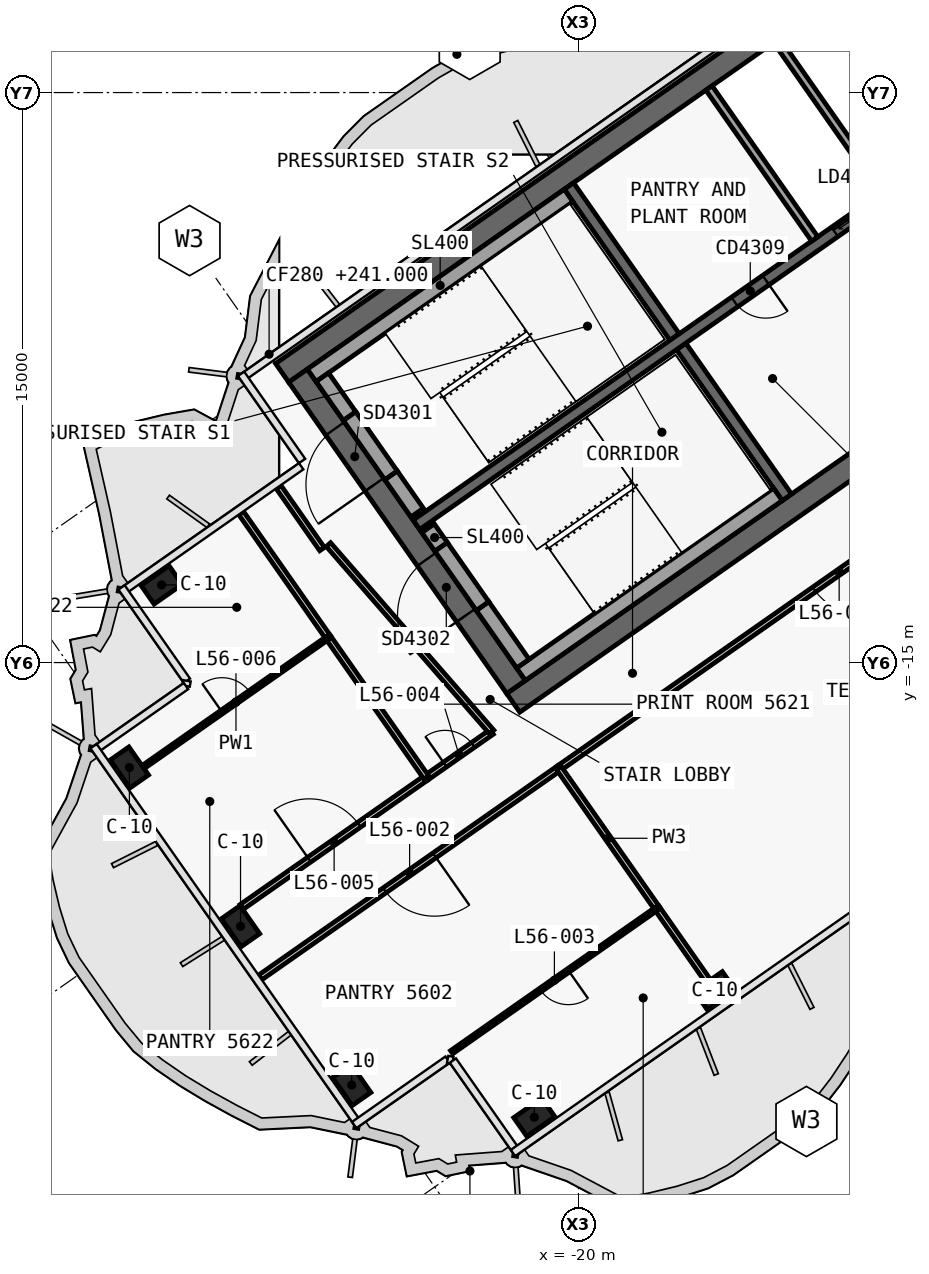
"""IFC4 building model, lengths in metres.
Left out: names, types, materials, properties, quantities, classifications, styles, units other than length and angle.
Written with IfcOpenShell. Run it as: python <this file> out.ifc"""

import sys

from ifc_helpers import new_model, si_unit, direction, frame, frame_2d, origin, origin_2d, place, context, subcontext, project, spatial, polyline, rectangle, outline, extrude, element, fill, save


model = new_model("IFC4")
c1 = context("Model", 3, precision=1e-05, world=origin(), true_north=direction((0.0, 1.0)))
c2 = subcontext(c1, "Body", "Model", "MODEL_VIEW")
j1 = project(units=[si_unit("LENGTHUNIT", "METRE"), si_unit("PLANEANGLEUNIT", "RADIAN")], contexts=[c1])
p1 = place(None, origin())
s1 = spatial("IfcSite", under=j1, at=p1, CompositionType="ELEMENT")
p2 = place(p1, origin())
s2 = spatial("IfcBuilding", under=s1, at=p2, CompositionType="ELEMENT")
p3 = place(p2, frame((0.0, 0.0, 241.0)))
s3 = spatial("IfcBuildingStorey", under=s2, at=p3, CompositionType="ELEMENT", Elevation=241.0)
p4 = place(p3, frame((-0.028, 12.066, 0.0), z_axis=(0.0, 0.0, 1.0), x_axis=(-0.819151382952, -0.573577380837, 0.0)))
e1 = element("IfcWall", 1, at=p4, inside=s3, PredefinedType="SHEAR", context=c2, shape_type="SweptSolid", body=[
    extrude(outline(polyline([(33.898, 0.3), (0.42, 0.3), (0.0, -0.3), (33.898, -0.3), (33.898, 0.3)])), origin(), (0.0, 0.0, 1.0), 3.9),
])
p5 = place(p3, frame((-0.028, -0.874, 0.0), z_axis=(0.0, 0.0, 1.0), x_axis=(-0.819150035022, -0.573579305871, 0.0)))
e2 = element("IfcWall", 2, at=p5, inside=s3, PredefinedType="SHEAR", context=c2, shape_type="SweptSolid", body=[
    extrude(outline(polyline([(26.476, 0.3), (0.42, 0.3), (0.0, -0.3), (26.476, -0.3), (26.476, 0.3)])), origin(), (0.0, 0.0, 1.0), 3.9),
])
p6 = place(p5, frame((2.976, 0.0, 0.0)))
e3 = element("IfcOpeningElement", 3, at=p6, cuts=e2, PredefinedType="OPENING", context=c2, shape_type="SweptSolid", body=[
    extrude(rectangle(XDim=2.4, YDim=2.1, at=frame_2d((1.2, 1.05))), frame((0.0, 0.31, 0.0), z_axis=(0.0, -1.0, 0.0), x_axis=(1.0, 0.0, 0.0)), (0.0, 0.0, 1.0), 0.62),
])
p7 = place(p5, frame((11.776, 0.0, 0.0)))
e4 = element("IfcOpeningElement", 4, at=p7, cuts=e2, PredefinedType="OPENING", context=c2, shape_type="SweptSolid", body=[
    extrude(rectangle(XDim=2.4, YDim=2.1, at=frame_2d((1.2, 1.05))), frame((0.0, 0.31, 0.0), z_axis=(0.0, -1.0, 0.0), x_axis=(1.0, 0.0, 0.0)), (0.0, 0.0, 1.0), 0.62),
])
p8 = place(p3, frame((-21.642, -15.642, 0.0), z_axis=(0.0, 0.0, 1.0), x_axis=(-0.573586866468, 0.819144740944, 0.0)))
e5 = element("IfcWall", 5, at=p8, inside=s3, PredefinedType="SHEAR", context=c2, shape_type="SweptSolid", body=[
    extrude(outline(polyline([(0.0, 0.3), (0.0, -0.3), (10.0, -0.3), (10.0, 0.3), (0.0, 0.3)])), origin(), (0.0, 0.0, 1.0), 3.9),
])
p9 = place(p8, frame((6.5, 0.0, 0.0)))
e6 = element("IfcOpeningElement", 6, at=p9, cuts=e5, PredefinedType="OPENING", context=c2, shape_type="SweptSolid", body=[
    extrude(rectangle(XDim=1.8, YDim=2.1, at=frame_2d((0.9, 1.05))), frame((0.0, 0.31, 0.0), z_axis=(0.0, -1.0, 0.0), x_axis=(1.0, 0.0, 0.0)), (0.0, 0.0, 1.0), 0.62),
])
p10 = place(p8, frame((2.3, 0.0, 0.0)))
e7 = element("IfcOpeningElement", 7, at=p10, cuts=e5, PredefinedType="OPENING", context=c2, shape_type="SweptSolid", body=[
    extrude(rectangle(XDim=1.8, YDim=2.1, at=frame_2d((0.9, 1.05))), frame((0.0, 0.31, 0.0), z_axis=(0.0, -1.0, 0.0), x_axis=(1.0, 0.0, 0.0)), (0.0, 0.0, 1.0), 0.62),
])
p11 = place(p3, frame((-10.097, -1.271, 0.0), z_axis=(0.0, 0.0, 1.0), x_axis=(-0.573560315113, 0.819163332265, 0.0)))
e8 = element("IfcWall", 8, at=p11, inside=s3, PredefinedType="SHEAR", context=c2, shape_type="SweptSolid", body=[
    extrude(outline(polyline([(4.85, -0.15), (4.85, 0.15), (0.0, 0.15), (0.0, -0.15), (4.85, -0.15)])), origin(), (0.0, 0.0, 1.0), 3.9),
])
p12 = place(p3, frame((-14.515, -10.652, 0.0), z_axis=(0.0, 0.0, 1.0), x_axis=(-0.573560315113, 0.819163332265, 0.0)))
e9 = element("IfcWall", 9, at=p12, inside=s3, PredefinedType="SHEAR", context=c2, shape_type="SweptSolid", body=[
    extrude(outline(polyline([(4.85, 0.15), (0.0, 0.15), (0.0, -0.15), (4.85, -0.15), (4.85, 0.15)])), origin(), (0.0, 0.0, 1.0), 3.9),
])
p13 = place(p3, frame((-17.469, -6.433, 0.0), z_axis=(0.0, 0.0, 1.0), x_axis=(-0.573594092424, 0.81913968109, 0.0)))
e10 = element("IfcWall", 10, at=p13, inside=s3, PredefinedType="SHEAR", context=c2, shape_type="SweptSolid", body=[
    extrude(outline(polyline([(4.85, -0.15), (4.85, 0.15), (0.0, 0.15), (0.0, -0.15), (4.85, -0.15)])), origin(), (0.0, 0.0, 1.0), 3.9),
])
p14 = place(p3, frame((-2.638, 3.768, 0.0), z_axis=(0.0, 0.0, 1.0), x_axis=(-0.819155014212, -0.573572194837, 0.0)))
e11 = element("IfcWall", 11, at=p14, inside=s3, PredefinedType="SHEAR", context=c2, shape_type="SweptSolid", body=[
    extrude(outline(polyline([(26.4, 0.15), (0.0, 0.15), (0.0, -0.15), (26.4, -0.15), (26.4, 0.15)])), origin(), (0.0, 0.0, 1.0), 3.9),
])
p15 = place(p14, frame((1.169, 0.0, 0.0)))
e12 = element("IfcOpeningElement", 12, at=p15, cuts=e11, PredefinedType="OPENING", context=c2, shape_type="SweptSolid", body=[
    extrude(rectangle(XDim=1.1, YDim=2.1, at=frame_2d((0.55, 1.05))), frame((0.0, 0.16, 0.0), z_axis=(0.0, -1.0, 0.0), x_axis=(1.0, 0.0, 0.0)), (0.0, 0.0, 1.0), 0.32),
])
p16 = place(p14, frame((3.206, 0.0, 0.0)))
e13 = element("IfcOpeningElement", 13, at=p16, cuts=e11, PredefinedType="OPENING", context=c2, shape_type="SweptSolid", body=[
    extrude(rectangle(XDim=1.1, YDim=2.1, at=frame_2d((0.55, 1.05))), frame((0.0, 0.16, 0.0), z_axis=(0.0, -1.0, 0.0), x_axis=(1.0, 0.0, 0.0)), (0.0, 0.0, 1.0), 0.32),
])
p17 = place(p14, frame((5.244, 0.0, 0.0)))
e14 = element("IfcOpeningElement", 14, at=p17, cuts=e11, PredefinedType="OPENING", context=c2, shape_type="SweptSolid", body=[
    extrude(rectangle(XDim=1.1, YDim=2.1, at=frame_2d((0.55, 1.05))), frame((0.0, 0.16, 0.0), z_axis=(0.0, -1.0, 0.0), x_axis=(1.0, 0.0, 0.0)), (0.0, 0.0, 1.0), 0.32),
])
p18 = place(p14, frame((7.281, 0.0, 0.0)))
e15 = element("IfcOpeningElement", 15, at=p18, cuts=e11, PredefinedType="OPENING", context=c2, shape_type="SweptSolid", body=[
    extrude(rectangle(XDim=1.1, YDim=2.1, at=frame_2d((0.55, 1.05))), frame((0.0, 0.16, 0.0), z_axis=(0.0, -1.0, 0.0), x_axis=(1.0, 0.0, 0.0)), (0.0, 0.0, 1.0), 0.32),
])
p19 = place(p14, frame((9.688, 0.0, 0.0)))
e16 = element("IfcOpeningElement", 16, at=p19, cuts=e11, PredefinedType="OPENING", context=c2, shape_type="SweptSolid", body=[
    extrude(rectangle(XDim=1.1, YDim=2.1, at=frame_2d((0.55, 1.05))), frame((0.0, 0.16, 0.0), z_axis=(0.0, -1.0, 0.0), x_axis=(1.0, 0.0, 0.0)), (0.0, 0.0, 1.0), 0.32),
])
p20 = place(p14, frame((11.863, 0.0, 0.0)))
e17 = element("IfcOpeningElement", 17, at=p20, cuts=e11, PredefinedType="OPENING", context=c2, shape_type="SweptSolid", body=[
    extrude(rectangle(XDim=1.1, YDim=2.1, at=frame_2d((0.55, 1.05))), frame((0.0, 0.16, 0.0), z_axis=(0.0, -1.0, 0.0), x_axis=(1.0, 0.0, 0.0)), (0.0, 0.0, 1.0), 0.32),
])
p21 = place(p14, frame((15.175, 0.0, 0.0)))
e18 = element("IfcOpeningElement", 18, at=p21, cuts=e11, PredefinedType="OPENING", context=c2, shape_type="SweptSolid", body=[
    extrude(rectangle(XDim=1.0, YDim=2.1, at=frame_2d((0.5, 1.05))), frame((0.0, 0.16, 0.0), z_axis=(0.0, -1.0, 0.0), x_axis=(1.0, 0.0, 0.0)), (0.0, 0.0, 1.0), 0.32),
])
for number, where, z_axis, x_axis in (
    (19, (-16.41, -23.637, 0.0), (0.0, 0.0, 1.0), (-0.819, -0.574, 0.0)),
    (20, (-21.161, -26.964, 0.0), (0.0, 0.0, 1.0), (-0.819, -0.574, 0.0)),
    (21, (-30.969, -12.956, 0.0), (0.0, 0.0, 1.0), (-0.819, -0.574, 0.0)),
    (22, (-25.966, -26.117, 0.0), (0.0, 0.0, 1.0), (-0.574, 0.819, 0.0)),
    (23, (-28.891, -21.939, 0.0), (0.0, 0.0, 1.0), (-0.574, 0.819, 0.0)),
    (24, (-31.816, -17.761, 0.0), (0.0, 0.0, 1.0), (-0.574, 0.819, 0.0)),
):
    element("IfcColumn", number, at=place(p3, frame(where, z_axis=z_axis, x_axis=x_axis)), inside=s3, PredefinedType="COLUMN", context=c2, shape_type="SweptSolid", body=[
        extrude(rectangle(XDim=0.9, YDim=0.6, at=origin_2d()), origin(), (0.0, 0.0, 1.0), 3.9),
    ])
p22 = place(p3, frame((-12.001, -2.605, 0.0), z_axis=(0.0, 0.0, 1.0), x_axis=(-0.573560315113, 0.819163332265, 0.0)))
e25 = element("IfcWall", 25, at=p22, inside=s3, PredefinedType="SOLIDWALL", context=c2, shape_type="SweptSolid", body=[
    extrude(rectangle(XDim=4.85, YDim=0.2, at=frame_2d((2.425, 0.0))), origin(), (0.0, 0.0, 1.0), 3.9),
])
p23 = place(p3, frame((-13.783, -3.852, 0.0), z_axis=(0.0, 0.0, 1.0), x_axis=(-0.573594092424, 0.81913968109, 0.0)))
e26 = element("IfcWall", 26, at=p23, inside=s3, PredefinedType="SOLIDWALL", context=c2, shape_type="SweptSolid", body=[
    extrude(rectangle(XDim=4.85, YDim=0.2, at=frame_2d((2.425, 0.0))), origin(), (0.0, 0.0, 1.0), 3.9),
])
p24 = place(p3, frame((-20.259, -2.71, 0.0), z_axis=(0.0, 0.0, 1.0), x_axis=(-0.81914849389, -0.573581506813, 0.0)))
e27 = element("IfcWall", 27, at=p24, inside=s3, PredefinedType="SOLIDWALL", context=c2, shape_type="SweptSolid", body=[
    extrude(rectangle(XDim=8.25, YDim=0.4, at=frame_2d((4.125, 0.0))), origin(), (0.0, 0.0, 1.0), 3.62),
])
p25 = place(p3, frame((-24.244, -11.055, 0.0), z_axis=(0.0, 0.0, 1.0), x_axis=(-0.573571582932, 0.819155442668, 0.0)))
e28 = element("IfcWall", 28, at=p25, inside=s3, PredefinedType="SOLIDWALL", context=c2, shape_type="SweptSolid", body=[
    extrude(rectangle(XDim=1.2, YDim=0.4, at=frame_2d((0.6, 0.0))), origin(), (0.0, 0.0, 1.0), 3.62),
])
p26 = place(p3, frame((-26.022, -8.515, 0.0), z_axis=(0.0, 0.0, 1.0), x_axis=(-0.573619628835, 0.819121798889, 0.0)))
e29 = element("IfcWall", 29, at=p26, inside=s3, PredefinedType="SOLIDWALL", context=c2, shape_type="SweptSolid", body=[
    extrude(rectangle(XDim=1.25, YDim=0.4, at=frame_2d((0.625, 0.0))), origin(), (0.0, 0.0, 1.0), 3.62),
])
p27 = place(p3, frame((-24.932, -10.072, 2.15), z_axis=(0.0, 0.0, 1.0), x_axis=(-0.573591692345, 0.819141361715, 0.0)))
e30 = element("IfcWall", 30, at=p27, inside=s3, PredefinedType="SOLIDWALL", context=c2, shape_type="SweptSolid", body=[
    extrude(rectangle(XDim=1.9, YDim=0.4, at=frame_2d((0.95, 0.0))), origin(), (0.0, 0.0, 1.0), 1.47),
])
p28 = place(p3, frame((-14.753, -10.574, 0.0), z_axis=(0.0, 0.0, 1.0), x_axis=(-0.819158229677, -0.573567602601, 0.0)))
e31 = element("IfcWall", 31, at=p28, inside=s3, PredefinedType="SOLIDWALL", context=c2, shape_type="SweptSolid", body=[
    extrude(rectangle(XDim=8.25, YDim=0.4, at=frame_2d((4.125, 0.0))), origin(), (0.0, 0.0, 1.0), 3.62),
])
p29 = place(p3, frame((-21.462, -15.028, 0.0), z_axis=(0.0, 0.0, 1.0), x_axis=(-0.573559770908, 0.819163713305, 0.0)))
e32 = element("IfcWall", 32, at=p29, inside=s3, PredefinedType="SOLIDWALL", context=c2, shape_type="SweptSolid", body=[
    extrude(rectangle(XDim=1.85, YDim=0.4, at=frame_2d((0.925, 0.0))), origin(), (0.0, 0.0, 1.0), 3.62),
])
p30 = place(p3, frame((-23.613, -11.956, 0.0), z_axis=(0.0, 0.0, 1.0), x_axis=(-0.573435029941, 0.819251039936, 0.0)))
e33 = element("IfcWall", 33, at=p30, inside=s3, PredefinedType="SOLIDWALL", context=c2, shape_type="SweptSolid", body=[
    extrude(rectangle(XDim=0.6, YDim=0.4, at=frame_2d((0.3, 0.0))), origin(), (0.0, 0.0, 1.0), 3.62),
])
p31 = place(p3, frame((-22.523, -13.512, 2.15), z_axis=(0.0, 0.0, 1.0), x_axis=(-0.573591692345, 0.819141361715, 0.0)))
e34 = element("IfcWall", 34, at=p31, inside=s3, PredefinedType="SOLIDWALL", context=c2, shape_type="SweptSolid", body=[
    extrude(rectangle(XDim=1.9, YDim=0.4, at=frame_2d((0.95, 0.0))), origin(), (0.0, 0.0, 1.0), 1.47),
])
p32 = place(p3, frame((-24.002, -18.028, 0.0), z_axis=(0.0, 0.0, 1.0), x_axis=(0.819144473797, 0.573587247982, 0.0)))
e35 = element("IfcWall", 35, at=p32, inside=s3, PredefinedType="PARTITIONING", context=c2, shape_type="SweptSolid", body=[
    extrude(rectangle(XDim=2.099, YDim=0.15, at=frame_2d((1.049, 0.0))), origin(), (0.0, 0.0, 1.0), 3.62),
])
p33 = place(p32, frame((0.599, 0.0, 0.0)))
e36 = element("IfcOpeningElement", 36, at=p33, cuts=e35, PredefinedType="OPENING", context=c2, shape_type="SweptSolid", body=[
    extrude(rectangle(XDim=0.9, YDim=2.1, at=frame_2d((0.45, 1.05))), frame((0.0, 0.085, 0.0), z_axis=(0.0, -1.0, 0.0), x_axis=(1.0, 0.0, 0.0)), (0.0, 0.0, 1.0), 0.17),
])
p34 = place(p3, frame((-28.858, -21.428, 0.0), z_axis=(0.0, 0.0, 1.0), x_axis=(0.819137166599, 0.573597683308, 0.0)))
e37 = element("IfcWall", 37, at=p34, inside=s3, PredefinedType="PARTITIONING", context=c2, shape_type="SweptSolid", body=[
    extrude(rectangle(XDim=5.932, YDim=0.15, at=frame_2d((2.966, 0.0))), origin(), (0.0, 0.0, 1.0), 3.05),
])
p35 = place(p34, frame((2.166, 0.0, 0.0)))
e38 = element("IfcOpeningElement", 38, at=p35, cuts=e37, PredefinedType="OPENING", context=c2, shape_type="SweptSolid", body=[
    extrude(rectangle(XDim=1.6, YDim=2.1, at=frame_2d((0.8, 1.05))), frame((0.0, 0.085, 0.0), z_axis=(0.0, -1.0, 0.0), x_axis=(1.0, 0.0, 0.0)), (0.0, 0.0, 1.0), 0.17),
])
p36 = place(p3, frame((-5.766, -7.456, 0.0), z_axis=(0.0, 0.0, 1.0), x_axis=(-0.819153544995, -0.573574293115, 0.0)))
e39 = element("IfcWall", 39, at=p36, inside=s3, PredefinedType="PARTITIONING", context=c2, shape_type="SweptSolid", body=[
    extrude(rectangle(XDim=18.002, YDim=0.15, at=frame_2d((9.001, 0.0))), origin(), (0.0, 0.0, 1.0), 3.05),
])
p37 = place(p36, frame((8.201, 0.0, 0.0)))
e40 = element("IfcOpeningElement", 40, at=p37, cuts=e39, PredefinedType="OPENING", context=c2, shape_type="SweptSolid", body=[
    extrude(rectangle(XDim=1.6, YDim=2.1, at=frame_2d((0.8, 1.05))), frame((0.0, 0.085, 0.0), z_axis=(0.0, -1.0, 0.0), x_axis=(1.0, 0.0, 0.0)), (0.0, 0.0, 1.0), 0.17),
])
p38 = place(p3, frame((-20.51, -17.779, 0.0), z_axis=(0.0, 0.0, 1.0), x_axis=(-0.819147101588, -0.573583495196, 0.0)))
e41 = element("IfcWall", 41, at=p38, inside=s3, PredefinedType="PARTITIONING", context=c2, shape_type="SweptSolid", body=[
    extrude(rectangle(XDim=9.602, YDim=0.15, at=frame_2d((4.801, 0.0))), origin(), (0.0, 0.0, 1.0), 3.0),
])
p39 = place(p38, frame((4.001, 0.0, 0.0)))
e42 = element("IfcOpeningElement", 42, at=p39, cuts=e41, PredefinedType="OPENING", context=c2, shape_type="SweptSolid", body=[
    extrude(rectangle(XDim=1.6, YDim=2.1, at=frame_2d((0.8, 1.05))), frame((0.0, 0.085, 0.0), z_axis=(0.0, -1.0, 0.0), x_axis=(1.0, 0.0, 0.0)), (0.0, 0.0, 1.0), 0.17),
])
p40 = place(p3, frame((-26.746, -12.014, 0.0), z_axis=(0.0, 0.0, 1.0), x_axis=(-0.573568836472, 0.819157365729, 0.0)))
e43 = element("IfcWall", 43, at=p40, inside=s3, PredefinedType="PARTITIONING", context=c2, shape_type="SweptSolid", body=[
    extrude(rectangle(XDim=2.0, YDim=0.15, at=frame_2d((1.0, 0.0))), origin(), (0.0, 0.0, 1.0), 3.05),
])
p41 = place(p3, frame((-22.284, -16.826, 0.0), z_axis=(0.0, 0.0, 1.0), x_axis=(-0.656758142177, 0.754101281449, 0.0)))
e44 = element("IfcWall", 44, at=p41, inside=s3, PredefinedType="PARTITIONING", context=c2, shape_type="SweptSolid", body=[
    extrude(rectangle(XDim=6.539, YDim=0.15, at=frame_2d((3.269, 0.0))), origin(), (0.0, 0.0, 1.0), 3.62),
])
p42 = place(p3, frame((-26.582, -14.341, 0.0), z_axis=(0.0, 0.0, 1.0), x_axis=(-0.573593387921, 0.81914017441, 0.0)))
e45 = element("IfcWall", 45, at=p42, inside=s3, PredefinedType="PARTITIONING", context=c2, shape_type="SweptSolid", body=[
    extrude(rectangle(XDim=4.001, YDim=0.15, at=frame_2d((2.0, 0.0))), origin(), (0.0, 0.0, 1.0), 3.05),
])
p43 = place(p3, frame((-24.001, -18.026, 0.0), z_axis=(0.0, 0.0, 1.0), x_axis=(-0.573589723117, 0.819142740634, 0.0)))
e46 = element("IfcWall", 46, at=p43, inside=s3, PredefinedType="PARTITIONING", context=c2, shape_type="SweptSolid", body=[
    extrude(rectangle(XDim=4.502, YDim=0.15, at=frame_2d((2.251, 0.0))), origin(), (0.0, 0.0, 1.0), 3.62),
])
p44 = place(p3, frame((-31.44, -17.741, 0.0), z_axis=(0.0, 0.0, 1.0), x_axis=(0.8191390677, 0.573594968395, 0.0)))
e47 = element("IfcWall", 47, at=p44, inside=s3, PredefinedType="PARTITIONING", context=c2, shape_type="SweptSolid", body=[
    extrude(rectangle(XDim=5.93, YDim=0.1, at=frame_2d((2.965, 0.0))), origin(), (0.0, 0.0, 1.0), 3.05),
])
p45 = place(p44, frame((2.515, 0.0, 0.0)))
e48 = element("IfcOpeningElement", 48, at=p45, cuts=e47, PredefinedType="OPENING", context=c2, shape_type="SweptSolid", body=[
    extrude(rectangle(XDim=0.9, YDim=2.1, at=frame_2d((0.45, 1.05))), frame((0.0, 0.06, 0.0), z_axis=(0.0, -1.0, 0.0), x_axis=(1.0, 0.0, 0.0)), (0.0, 0.0, 1.0), 0.12),
])
p46 = place(p3, frame((-16.594, -23.375, 0.0), z_axis=(0.0, 0.0, 1.0), x_axis=(-0.57362400197, 0.819118736426, 0.0)))
e49 = element("IfcWall", 49, at=p46, inside=s3, PredefinedType="PARTITIONING", context=c2, shape_type="SweptSolid", body=[
    extrude(rectangle(XDim=2.331, YDim=0.15, at=frame_2d((1.166, 0.0))), origin(), (0.0, 0.0, 1.0), 3.05),
])
p47 = place(p3, frame((-17.929, -21.468, 0.0), z_axis=(0.0, 0.0, 1.0), x_axis=(-0.573553333433, 0.819168220641, 0.0)))
e50 = element("IfcWall", 50, at=p47, inside=s3, PredefinedType="PARTITIONING", context=c2, shape_type="SweptSolid", body=[
    extrude(rectangle(XDim=4.502, YDim=0.15, at=frame_2d((2.251, 0.0))), origin(), (0.0, 0.0, 1.0), 3.05),
])
p48 = place(p3, frame((-17.929, -21.467, 0.0), z_axis=(0.0, 0.0, 1.0), x_axis=(-0.819158922237, -0.573566613498, 0.0)))
e51 = element("IfcWall", 51, at=p48, inside=s3, PredefinedType="PARTITIONING", context=c2, shape_type="SweptSolid", body=[
    extrude(rectangle(XDim=6.6, YDim=0.1, at=frame_2d((3.3, 0.0))), origin(), (0.0, 0.0, 1.0), 3.05),
])
p49 = place(p48, frame((2.85, 0.0, 0.0)))
e52 = element("IfcOpeningElement", 52, at=p49, cuts=e51, PredefinedType="OPENING", context=c2, shape_type="SweptSolid", body=[
    extrude(rectangle(XDim=0.9, YDim=2.1, at=frame_2d((0.45, 1.05))), frame((0.0, 0.06, 0.0), z_axis=(0.0, -1.0, 0.0), x_axis=(1.0, 0.0, 0.0)), (0.0, 0.0, 1.0), 0.12),
])
p50 = place(p20, origin())
e53 = element("IfcDoor", 53, at=p50, inside=s3, OperationType="SLIDING_TO_RIGHT", PredefinedType="DOOR", context=c2, shape_type="SweptSolid", body=[
    extrude(rectangle(XDim=1.1, YDim=2.1, at=frame_2d((0.55, 1.05))), frame((0.0, 0.025, 0.0), z_axis=(0.0, -1.0, 0.0), x_axis=(1.0, 0.0, 0.0)), (0.0, 0.0, 1.0), 0.05),
])
fill(e17, e53)
p51 = place(p21, origin())
e54 = element("IfcDoor", 54, at=p51, inside=s3, OperationType="SINGLE_SWING_RIGHT", PredefinedType="DOOR", context=c2, shape_type="SweptSolid", body=[
    extrude(rectangle(XDim=1.0, YDim=2.1, at=frame_2d((0.5, 1.05))), frame((0.0, 0.025, 0.0), z_axis=(0.0, -1.0, 0.0), x_axis=(1.0, 0.0, 0.0)), (0.0, 0.0, 1.0), 0.05),
])
fill(e18, e54)
p52 = place(p9, origin())
e55 = element("IfcDoor", 55, at=p52, inside=s3, OperationType="DOUBLE_DOOR_SINGLE_SWING", PredefinedType="DOOR", context=c2, shape_type="SweptSolid", body=[
    extrude(rectangle(XDim=1.8, YDim=2.1, at=frame_2d((0.9, 1.05))), frame((0.0, 0.025, 0.0), z_axis=(0.0, -1.0, 0.0), x_axis=(1.0, 0.0, 0.0)), (0.0, 0.0, 1.0), 0.05),
])
fill(e6, e55)
p53 = place(p10, origin())
e56 = element("IfcDoor", 56, at=p53, inside=s3, OperationType="DOUBLE_DOOR_SINGLE_SWING", PredefinedType="DOOR", context=c2, shape_type="SweptSolid", body=[
    extrude(rectangle(XDim=1.8, YDim=2.1, at=frame_2d((0.9, 1.05))), frame((0.0, 0.025, 0.0), z_axis=(0.0, -1.0, 0.0), x_axis=(1.0, 0.0, 0.0)), (0.0, 0.0, 1.0), 0.05),
])
fill(e7, e56)
p54 = place(p37, origin())
e57 = element("IfcDoor", 57, at=p54, inside=s3, OperationType="DOUBLE_DOOR_SINGLE_SWING", PredefinedType="DOOR", context=c2, shape_type="SweptSolid", body=[
    extrude(rectangle(XDim=1.6, YDim=2.1, at=frame_2d((0.8, 1.05))), frame((0.0, 0.025, 0.0), z_axis=(0.0, -1.0, 0.0), x_axis=(1.0, 0.0, 0.0)), (0.0, 0.0, 1.0), 0.05),
])
fill(e40, e57)
p55 = place(p39, origin())
e58 = element("IfcDoor", 58, at=p55, inside=s3, OperationType="DOUBLE_DOOR_SINGLE_SWING", PredefinedType="DOOR", context=c2, shape_type="SweptSolid", body=[
    extrude(rectangle(XDim=1.6, YDim=2.1, at=frame_2d((0.8, 1.05))), frame((0.0, 0.025, 0.0), z_axis=(0.0, -1.0, 0.0), x_axis=(1.0, 0.0, 0.0)), (0.0, 0.0, 1.0), 0.05),
])
fill(e42, e58)
p56 = place(p49, origin())
e59 = element("IfcDoor", 59, at=p56, inside=s3, OperationType="SINGLE_SWING_RIGHT", PredefinedType="DOOR", context=c2, shape_type="SweptSolid", body=[
    extrude(rectangle(XDim=0.9, YDim=2.1, at=frame_2d((0.45, 1.05))), frame((0.0, 0.025, 0.0), z_axis=(0.0, -1.0, 0.0), x_axis=(1.0, 0.0, 0.0)), (0.0, 0.0, 1.0), 0.05),
])
fill(e52, e59)
p57 = place(p33, origin())
e60 = element("IfcDoor", 60, at=p57, inside=s3, OperationType="SINGLE_SWING_RIGHT", PredefinedType="DOOR", context=c2, shape_type="SweptSolid", body=[
    extrude(rectangle(XDim=0.9, YDim=2.1, at=frame_2d((0.45, 1.05))), frame((0.0, 0.025, 0.0), z_axis=(0.0, -1.0, 0.0), x_axis=(1.0, 0.0, 0.0)), (0.0, 0.0, 1.0), 0.05),
])
fill(e36, e60)
p58 = place(p35, origin())
e61 = element("IfcDoor", 61, at=p58, inside=s3, OperationType="DOUBLE_DOOR_SINGLE_SWING", PredefinedType="DOOR", context=c2, shape_type="SweptSolid", body=[
    extrude(rectangle(XDim=1.6, YDim=2.1, at=frame_2d((0.8, 1.05))), frame((0.0, 0.025, 0.0), z_axis=(0.0, -1.0, 0.0), x_axis=(1.0, 0.0, 0.0)), (0.0, 0.0, 1.0), 0.05),
])
fill(e38, e61)
p59 = place(p45, origin())
e62 = element("IfcDoor", 62, at=p59, inside=s3, OperationType="SINGLE_SWING_RIGHT", PredefinedType="DOOR", context=c2, shape_type="SweptSolid", body=[
    extrude(rectangle(XDim=0.9, YDim=2.1, at=frame_2d((0.45, 1.05))), frame((0.0, 0.025, 0.0), z_axis=(0.0, -1.0, 0.0), x_axis=(1.0, 0.0, 0.0)), (0.0, 0.0, 1.0), 0.05),
])
fill(e48, e62)
save(model, sys.argv[1])
